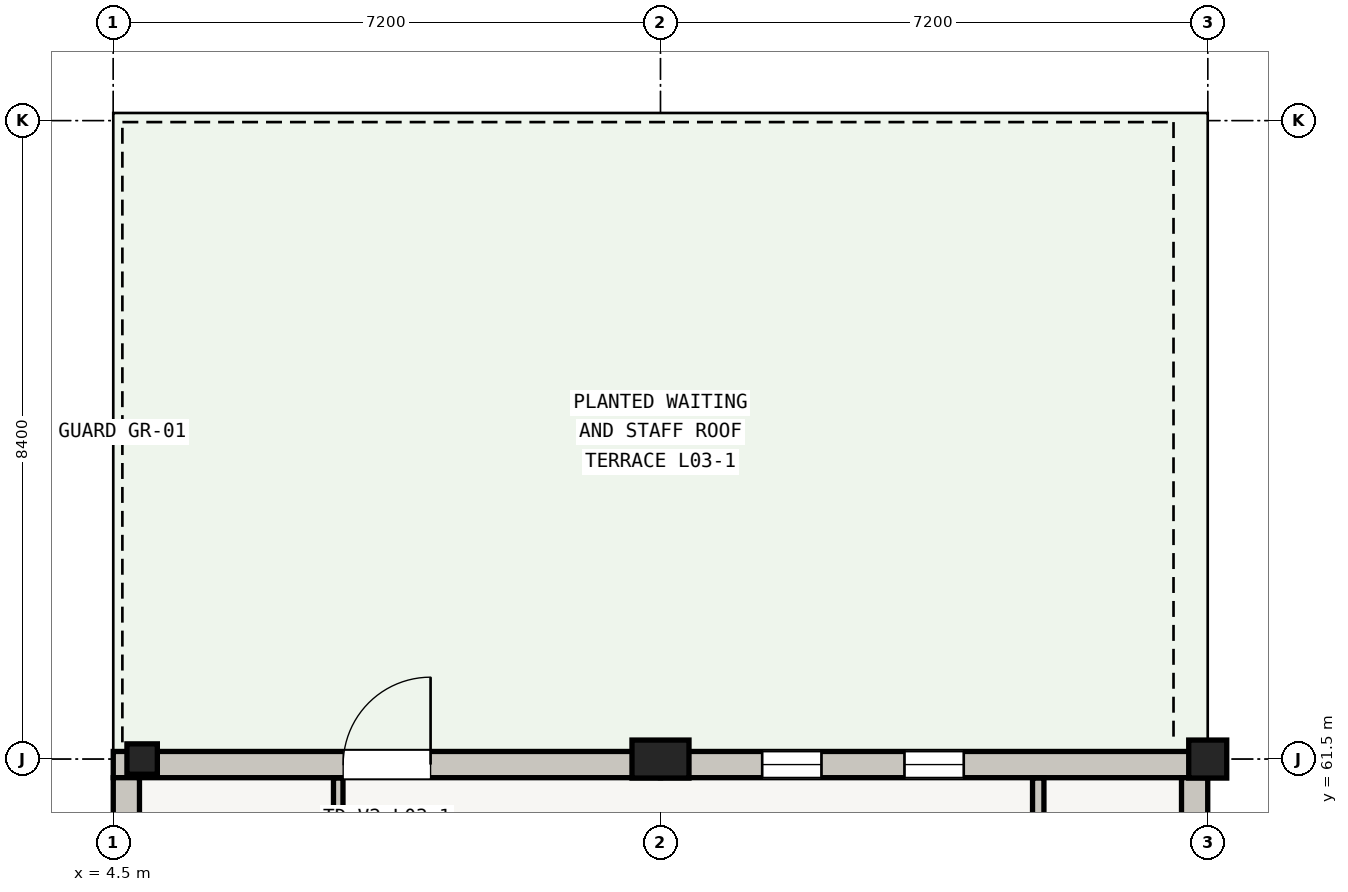
"""IFC4 building model, lengths in metres.
Left out: names, types, materials, properties, quantities, classifications, styles, units other than length and angle.
Written with IfcOpenShell. Run it as: python <this file> out.ifc"""

import sys

from ifc_helpers import new_model, si_unit, direction, frame, frame_2d, origin, origin_2d, place, context, subcontext, project, spatial, rectangle, extrude, element, fill, save


model = new_model("IFC4")
c1 = context("Model", 3, precision=1e-05, world=origin(), true_north=direction((0.0, 1.0)))
c2 = subcontext(c1, "Body", "Model", "MODEL_VIEW")
j1 = project(units=[si_unit("LENGTHUNIT", "METRE"), si_unit("PLANEANGLEUNIT", "RADIAN")], contexts=[c1])
p1 = place(None, origin())
s1 = spatial("IfcSite", under=j1, at=p1, CompositionType="ELEMENT")
p2 = place(p1, origin())
s2 = spatial("IfcBuilding", under=s1, at=p2, CompositionType="ELEMENT")
p3 = place(p2, frame((0.0, 0.0, 12.9)))
s3 = spatial("IfcBuildingStorey", under=s2, at=p3, CompositionType="ELEMENT", Elevation=12.9)
p4 = place(p3, frame((4.88, 61.5, 0.0), z_axis=(0.0, 0.0, 1.0), x_axis=(1.0, 0.0, 0.0)))
e1 = element("IfcColumn", 1, at=p4, inside=s3, PredefinedType="COLUMN", context=c2, shape_type="SweptSolid", body=[
    extrude(rectangle(XDim=0.4, YDim=0.4, at=origin_2d()), origin(), (0.0, 0.0, 1.0), 3.92),
])
p5 = place(p3, frame((11.7, 61.5, 0.0), z_axis=(0.0, 0.0, 1.0), x_axis=(1.0, 0.0, 0.0)))
e2 = element("IfcColumn", 2, at=p5, inside=s3, PredefinedType="COLUMN", context=c2, shape_type="SweptSolid", body=[
    extrude(rectangle(XDim=0.75, YDim=0.5, at=origin_2d()), origin(), (0.0, 0.0, 1.0), 3.92),
])
p6 = place(p3, frame((18.9, 61.5, 0.0), z_axis=(0.0, 0.0, 1.0), x_axis=(1.0, 0.0, 0.0)))
e3 = element("IfcColumn", 3, at=p6, inside=s3, PredefinedType="COLUMN", context=c2, shape_type="SweptSolid", body=[
    extrude(rectangle(XDim=0.5, YDim=0.5, at=origin_2d()), origin(), (0.0, 0.0, 1.0), 3.92),
])
p7 = place(p3, frame((4.5, 61.427, 0.0), z_axis=(0.0, 0.0, 1.0), x_axis=(1.0, 0.0, 0.0)))
e4 = element("IfcWall", 4, at=p7, inside=s3, PredefinedType="SOLIDWALL", context=c2, shape_type="SweptSolid", body=[
    extrude(rectangle(XDim=7.2, YDim=0.345, at=frame_2d((3.6, 0.0))), origin(), (0.0, 0.0, 1.0), 2.955),
])
p8 = place(p7, frame((3.025, 0.0, 0.19)))
e5 = element("IfcOpeningElement", 5, at=p8, cuts=e4, PredefinedType="OPENING", context=c2, shape_type="SweptSolid", body=[
    extrude(rectangle(XDim=1.15, YDim=2.02, at=frame_2d((0.575, 1.01))), frame((0.0, 0.172, 0.0), z_axis=(0.0, -1.0, 0.0), x_axis=(1.0, 0.0, 0.0)), (0.0, 0.0, 1.0), 0.345),
])
p9 = place(p3, frame((11.7, 61.427, 0.0), z_axis=(0.0, 0.0, 1.0), x_axis=(1.0, 0.0, 0.0)))
e6 = element("IfcWall", 6, at=p9, inside=s3, PredefinedType="SOLIDWALL", context=c2, shape_type="SweptSolid", body=[
    extrude(rectangle(XDim=7.2, YDim=0.345, at=frame_2d((3.6, 0.0))), origin(), (0.0, 0.0, 1.0), 2.955),
])
p10 = place(p9, frame((1.338, 0.0, 0.6)))
e7 = element("IfcOpeningElement", 7, at=p10, cuts=e6, PredefinedType="OPENING", context=c2, shape_type="SweptSolid", body=[
    extrude(rectangle(XDim=0.78, YDim=1.95, at=frame_2d((0.39, 0.975))), frame((0.0, 0.172, 0.0), z_axis=(0.0, -1.0, 0.0), x_axis=(1.0, 0.0, 0.0)), (0.0, 0.0, 1.0), 0.345),
])
p11 = place(p9, frame((3.21, 0.0, 0.6)))
e8 = element("IfcOpeningElement", 8, at=p11, cuts=e6, PredefinedType="OPENING", context=c2, shape_type="SweptSolid", body=[
    extrude(rectangle(XDim=0.78, YDim=1.95, at=frame_2d((0.39, 0.975))), frame((0.0, 0.172, 0.0), z_axis=(0.0, -1.0, 0.0), x_axis=(1.0, 0.0, 0.0)), (0.0, 0.0, 1.0), 0.345),
])
p12 = place(p3, frame((18.728, 61.255, 0.0), z_axis=(0.0, 0.0, 1.0), x_axis=(0.0, -1.0, 0.0)))
e9 = element("IfcWall", 9, at=p12, inside=s3, PredefinedType="SOLIDWALL", context=c2, shape_type="SweptSolid", body=[
    extrude(rectangle(XDim=8.155, YDim=0.345, at=frame_2d((4.077, 0.0))), origin(), (0.0, 0.0, 1.0), 2.955),
])
p13 = place(p12, frame((1.517, 0.0, 0.55)))
e10 = element("IfcOpeningElement", 10, at=p13, cuts=e9, PredefinedType="OPENING", context=c2, shape_type="SweptSolid", body=[
    extrude(rectangle(XDim=0.88, YDim=2.12, at=frame_2d((0.44, 1.06))), frame((0.0, 0.172, 0.0), z_axis=(0.0, -1.0, 0.0), x_axis=(1.0, 0.0, 0.0)), (0.0, 0.0, 1.0), 0.345),
])
p14 = place(p12, frame((3.637, 0.0, 0.55)))
e11 = element("IfcOpeningElement", 11, at=p14, cuts=e9, PredefinedType="OPENING", context=c2, shape_type="SweptSolid", body=[
    extrude(rectangle(XDim=0.88, YDim=2.12, at=frame_2d((0.44, 1.06))), frame((0.0, 0.172, 0.0), z_axis=(0.0, -1.0, 0.0), x_axis=(1.0, 0.0, 0.0)), (0.0, 0.0, 1.0), 0.345),
])
p15 = place(p12, frame((5.758, 0.0, 0.55)))
e12 = element("IfcOpeningElement", 12, at=p15, cuts=e9, PredefinedType="OPENING", context=c2, shape_type="SweptSolid", body=[
    extrude(rectangle(XDim=0.88, YDim=2.12, at=frame_2d((0.44, 1.06))), frame((0.0, 0.172, 0.0), z_axis=(0.0, -1.0, 0.0), x_axis=(1.0, 0.0, 0.0)), (0.0, 0.0, 1.0), 0.345),
])
p16 = place(p3, frame((4.673, 53.1, 0.0), z_axis=(0.0, 0.0, 1.0), x_axis=(0.0, 1.0, 0.0)))
e13 = element("IfcWall", 13, at=p16, inside=s3, PredefinedType="SOLIDWALL", context=c2, shape_type="SweptSolid", body=[
    extrude(rectangle(XDim=8.155, YDim=0.345, at=frame_2d((4.077, 0.0))), origin(), (0.0, 0.0, 1.0), 3.305),
])
p17 = place(p16, frame((1.547, 0.0, 0.55)))
e14 = element("IfcOpeningElement", 14, at=p17, cuts=e13, PredefinedType="OPENING", context=c2, shape_type="SweptSolid", body=[
    extrude(rectangle(XDim=0.82, YDim=2.2, at=frame_2d((0.41, 1.1))), frame((0.0, 0.172, 0.0), z_axis=(0.0, -1.0, 0.0), x_axis=(1.0, 0.0, 0.0)), (0.0, 0.0, 1.0), 0.345),
])
p18 = place(p16, frame((3.667, 0.0, 0.55)))
e15 = element("IfcOpeningElement", 15, at=p18, cuts=e13, PredefinedType="OPENING", context=c2, shape_type="SweptSolid", body=[
    extrude(rectangle(XDim=0.82, YDim=2.2, at=frame_2d((0.41, 1.1))), frame((0.0, 0.172, 0.0), z_axis=(0.0, -1.0, 0.0), x_axis=(1.0, 0.0, 0.0)), (0.0, 0.0, 1.0), 0.345),
])
p19 = place(p16, frame((5.788, 0.0, 0.55)))
e16 = element("IfcOpeningElement", 16, at=p19, cuts=e13, PredefinedType="OPENING", context=c2, shape_type="SweptSolid", body=[
    extrude(rectangle(XDim=0.82, YDim=2.2, at=frame_2d((0.41, 1.1))), frame((0.0, 0.172, 0.0), z_axis=(0.0, -1.0, 0.0), x_axis=(1.0, 0.0, 0.0)), (0.0, 0.0, 1.0), 0.345),
])
p20 = place(p3, frame((16.67, 15.92, 0.0), z_axis=(0.0, 0.0, 1.0), x_axis=(0.0, 1.0, 0.0)))
e17 = element("IfcWall", 17, at=p20, inside=s3, PredefinedType="PARTITIONING", context=c2, shape_type="SweptSolid", body=[
    extrude(rectangle(XDim=45.33, YDim=0.15, at=frame_2d((22.665, 0.0))), origin(), (0.0, 0.0, 1.0), 2.94),
])
p21 = place(p20, frame((22.165, 0.0, 0.0)))
e18 = element("IfcOpeningElement", 18, at=p21, cuts=e17, PredefinedType="OPENING", context=c2, shape_type="SweptSolid", body=[
    extrude(rectangle(XDim=1.0, YDim=2.05, at=frame_2d((0.5, 1.025))), frame((0.0, 0.075, 0.0), z_axis=(0.0, -1.0, 0.0), x_axis=(1.0, 0.0, 0.0)), (0.0, 0.0, 1.0), 0.15),
])
p22 = place(p3, frame((7.46, 61.25, 0.0), z_axis=(0.0, 0.0, 1.0), x_axis=(0.0, -1.0, 0.0)))
e19 = element("IfcWall", 19, at=p22, inside=s3, PredefinedType="PARTITIONING", context=c2, shape_type="SweptSolid", body=[
    extrude(rectangle(XDim=35.4, YDim=0.125, at=frame_2d((17.7, 0.0))), origin(), (0.0, 0.0, 1.0), 2.94),
])
p23 = place(p8, origin())
e20 = element("IfcDoor", 20, at=p23, inside=s3, OperationType="SINGLE_SWING_RIGHT", PredefinedType="DOOR", context=c2, shape_type="SweptSolid", body=[
    extrude(rectangle(XDim=1.15, YDim=2.02, at=frame_2d((0.575, 1.01))), frame((0.0, 0.025, 0.0), z_axis=(0.0, -1.0, 0.0), x_axis=(1.0, 0.0, 0.0)), (0.0, 0.0, 1.0), 0.05),
])
fill(e5, e20)
p24 = place(p10, origin())
e21 = element("IfcWindow", 21, at=p24, inside=s3, PartitioningType="SINGLE_PANEL", PredefinedType="WINDOW", context=c2, shape_type="SweptSolid", body=[
    extrude(rectangle(XDim=0.78, YDim=1.95, at=frame_2d((0.39, 0.975))), frame((0.0, 0.03, 0.0), z_axis=(0.0, -1.0, 0.0), x_axis=(1.0, 0.0, 0.0)), (0.0, 0.0, 1.0), 0.06),
])
fill(e7, e21)
p25 = place(p11, origin())
e22 = element("IfcWindow", 22, at=p25, inside=s3, PartitioningType="SINGLE_PANEL", PredefinedType="WINDOW", context=c2, shape_type="SweptSolid", body=[
    extrude(rectangle(XDim=0.78, YDim=1.95, at=frame_2d((0.39, 0.975))), frame((0.0, 0.03, 0.0), z_axis=(0.0, -1.0, 0.0), x_axis=(1.0, 0.0, 0.0)), (0.0, 0.0, 1.0), 0.06),
])
fill(e8, e22)
save(model, sys.argv[1])
